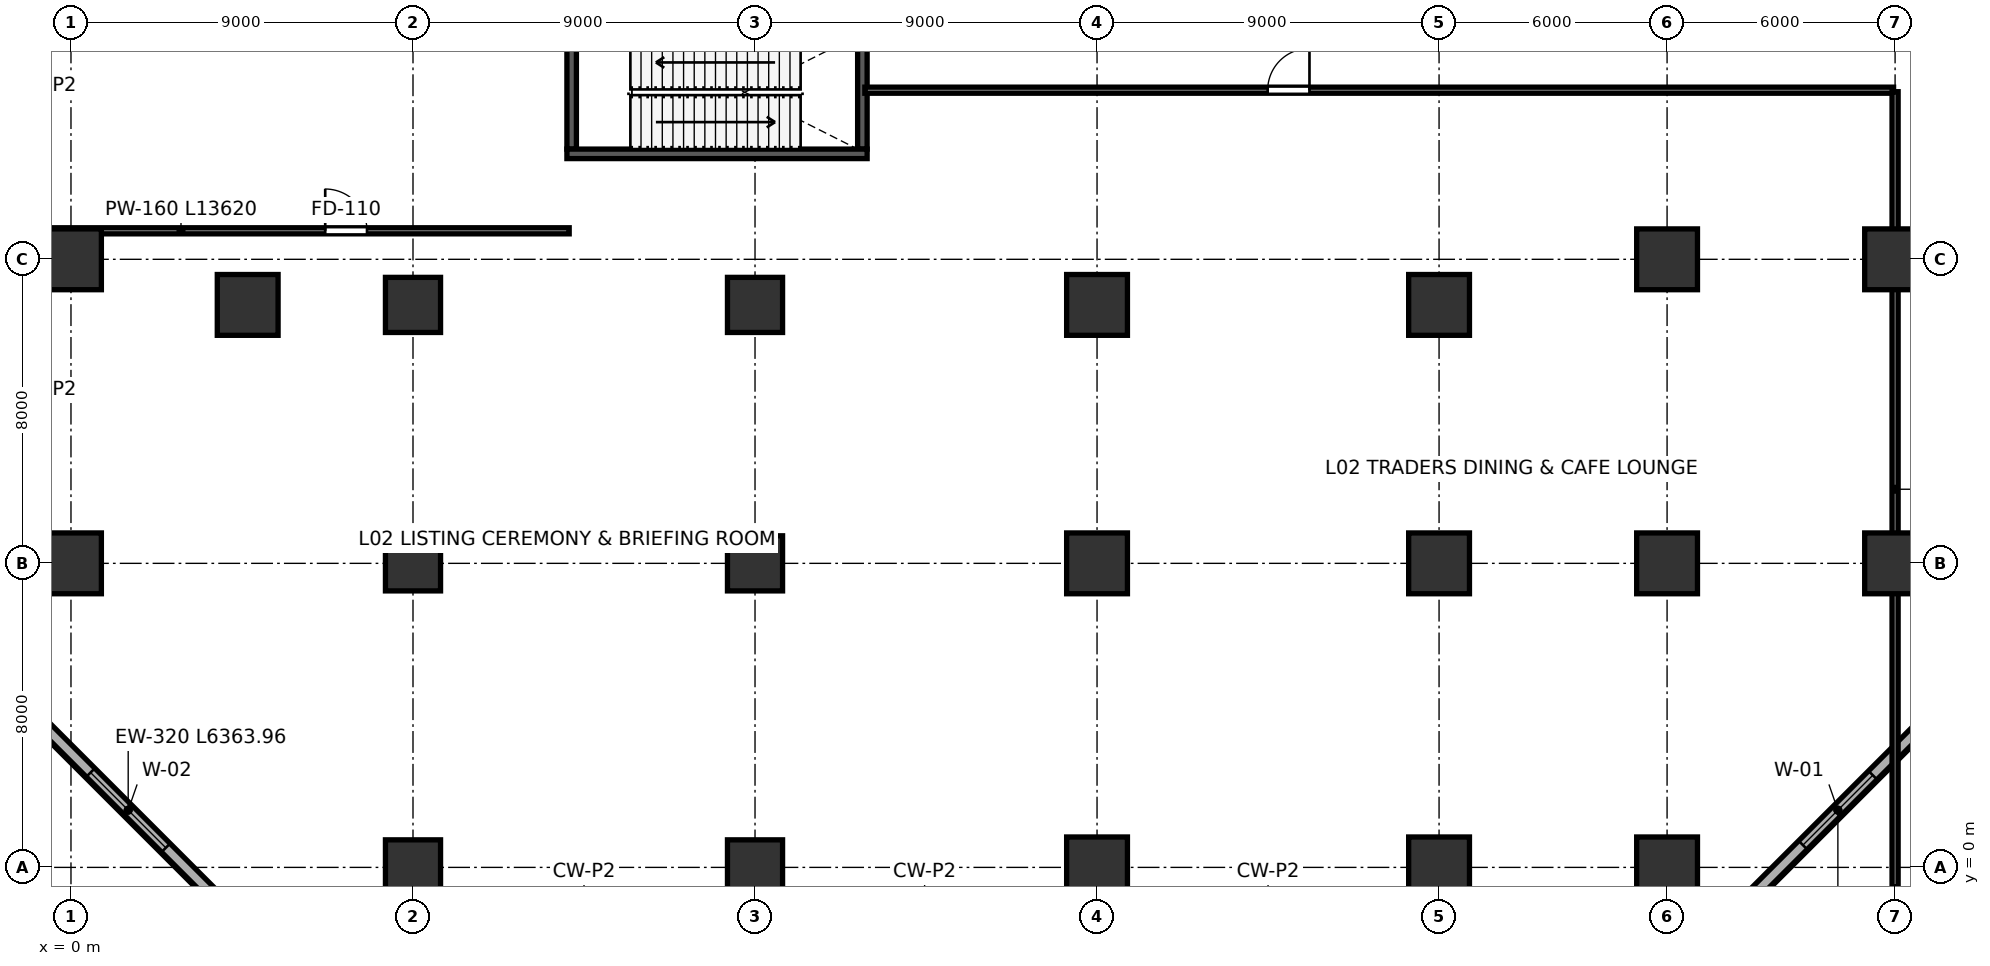
"""IFC4 building model, lengths in metres.
Left out: names, types, materials, properties, quantities, classifications, styles, units other than length and angle.
Written with IfcOpenShell. Run it as: python <this file> out.ifc"""

import sys

from ifc_helpers import new_model, si_unit, direction, frame, frame_2d, origin, origin_2d, place, context, subcontext, project, spatial, rectangle, extrude, source, transform, mapped, element, fill, save


model = new_model("IFC4")
c1 = context("Model", 3, precision=1e-05, world=origin(), true_north=direction((0.0, 1.0)))
c2 = subcontext(c1, "Body", "Model", "MODEL_VIEW")
j1 = project(units=[si_unit("LENGTHUNIT", "METRE"), si_unit("PLANEANGLEUNIT", "RADIAN")], contexts=[c1])
p1 = place(None, origin())
s1 = spatial("IfcSite", under=j1, at=p1, CompositionType="ELEMENT")
p2 = place(p1, origin())
s2 = spatial("IfcBuilding", under=s1, at=p2, CompositionType="ELEMENT")
p3 = place(p2, frame((0.0, 0.0, 6.0)))
s3 = spatial("IfcBuildingStorey", under=s2, at=p3, CompositionType="ELEMENT", Elevation=6.0)
m1 = source(origin(), c2, "Body", "SweptSolid", [
    extrude(rectangle(XDim=1.6, YDim=1.6, at=origin_2d()), origin(), (0.0, 0.0, 1.0), 5.999),
])
for number, where, z_axis, x_axis in (
    (1, (0.0, 8.0, 0.001), (0.0, 0.0, 1.0), (1.0, 0.0, 0.0)),
    (2, (0.0, 16.0, 0.001), (0.0, 0.0, 1.0), (1.0, 0.0, 0.0)),
):
    element("IfcColumn", number, at=place(p3, frame(where, z_axis=z_axis, x_axis=x_axis)), inside=s3, PredefinedType="COLUMN", context=c2, shape_type="MappedRepresentation", body=[
        mapped(m1, transform((0.0, 0.0, 0.0), scale=1.0)),
    ])
m2 = source(origin(), c2, "Body", "SweptSolid", [
    extrude(rectangle(XDim=1.45, YDim=1.45, at=origin_2d()), origin(), (0.0, 0.0, 1.0), 5.999),
])
p4 = place(p3, frame((9.0, 0.0, 0.001), z_axis=(0.0, 0.0, 1.0), x_axis=(1.0, 0.0, 0.0)))
e3 = element("IfcColumn", 3, at=p4, inside=s3, PredefinedType="COLUMN", context=c2, shape_type="MappedRepresentation", body=[
    mapped(m2, transform((0.0, 0.0, 0.0), scale=1.0)),
])
m3 = source(origin(), c2, "Body", "SweptSolid", [
    extrude(rectangle(XDim=1.45, YDim=1.45, at=origin_2d()), origin(), (0.0, 0.0, 1.0), 5.999),
])
for number, where, z_axis, x_axis in (
    (4, (9.0, 8.0, 0.001), (0.0, 0.0, 1.0), (1.0, 0.0, 0.0)),
    (5, (9.0, 14.8, 0.001), (0.0, 0.0, 1.0), (1.0, 0.0, 0.0)),
):
    element("IfcColumn", number, at=place(p3, frame(where, z_axis=z_axis, x_axis=x_axis)), inside=s3, PredefinedType="COLUMN", context=c2, shape_type="MappedRepresentation", body=[
        mapped(m3, transform((0.0, 0.0, 0.0), scale=1.0)),
    ])
p5 = place(p3, frame((18.0, 0.0, 0.001), z_axis=(0.0, 0.0, 1.0), x_axis=(1.0, 0.0, 0.0)))
e6 = element("IfcColumn", 6, at=p5, inside=s3, PredefinedType="COLUMN", context=c2, shape_type="MappedRepresentation", body=[
    mapped(m2, transform((0.0, 0.0, 0.0), scale=1.0)),
])
for number, where, z_axis, x_axis in (
    (7, (18.0, 8.0, 0.001), (0.0, 0.0, 1.0), (1.0, 0.0, 0.0)),
    (8, (18.0, 14.8, 0.001), (0.0, 0.0, 1.0), (1.0, 0.0, 0.0)),
):
    element("IfcColumn", number, at=place(p3, frame(where, z_axis=z_axis, x_axis=x_axis)), inside=s3, PredefinedType="COLUMN", context=c2, shape_type="MappedRepresentation", body=[
        mapped(m3, transform((0.0, 0.0, 0.0), scale=1.0)),
    ])
p6 = place(p3, frame((27.0, 0.0, 0.001), z_axis=(0.0, 0.0, 1.0), x_axis=(1.0, 0.0, 0.0)))
e9 = element("IfcColumn", 9, at=p6, inside=s3, PredefinedType="COLUMN", context=c2, shape_type="MappedRepresentation", body=[
    mapped(m1, transform((0.0, 0.0, 0.0), scale=1.0)),
])
m4 = source(origin(), c2, "Body", "SweptSolid", [
    extrude(rectangle(XDim=1.6, YDim=1.6, at=origin_2d()), origin(), (0.0, 0.0, 1.0), 5.999),
])
for number, where, z_axis, x_axis in (
    (10, (27.0, 8.0, 0.001), (0.0, 0.0, 1.0), (1.0, 0.0, 0.0)),
    (11, (27.0, 14.8, 0.001), (0.0, 0.0, 1.0), (1.0, 0.0, 0.0)),
):
    element("IfcColumn", number, at=place(p3, frame(where, z_axis=z_axis, x_axis=x_axis)), inside=s3, PredefinedType="COLUMN", context=c2, shape_type="MappedRepresentation", body=[
        mapped(m4, transform((0.0, 0.0, 0.0), scale=1.0)),
    ])
p7 = place(p3, frame((36.0, 0.0, 0.001), z_axis=(0.0, 0.0, 1.0), x_axis=(1.0, 0.0, 0.0)))
e12 = element("IfcColumn", 12, at=p7, inside=s3, PredefinedType="COLUMN", context=c2, shape_type="MappedRepresentation", body=[
    mapped(m1, transform((0.0, 0.0, 0.0), scale=1.0)),
])
for number, where, z_axis, x_axis in (
    (13, (36.0, 8.0, 0.001), (0.0, 0.0, 1.0), (1.0, 0.0, 0.0)),
    (14, (36.0, 14.8, 0.001), (0.0, 0.0, 1.0), (1.0, 0.0, 0.0)),
):
    element("IfcColumn", number, at=place(p3, frame(where, z_axis=z_axis, x_axis=x_axis)), inside=s3, PredefinedType="COLUMN", context=c2, shape_type="MappedRepresentation", body=[
        mapped(m4, transform((0.0, 0.0, 0.0), scale=1.0)),
    ])
p8 = place(p3, frame((42.0, 0.0, 0.001), z_axis=(0.0, 0.0, 1.0), x_axis=(1.0, 0.0, 0.0)))
e15 = element("IfcColumn", 15, at=p8, inside=s3, PredefinedType="COLUMN", context=c2, shape_type="MappedRepresentation", body=[
    mapped(m1, transform((0.0, 0.0, 0.0), scale=1.0)),
])
for number, where, z_axis, x_axis in (
    (16, (42.0, 8.0, 0.001), (0.0, 0.0, 1.0), (1.0, 0.0, 0.0)),
    (17, (42.0, 16.0, 0.001), (0.0, 0.0, 1.0), (1.0, 0.0, 0.0)),
):
    element("IfcColumn", number, at=place(p3, frame(where, z_axis=z_axis, x_axis=x_axis)), inside=s3, PredefinedType="COLUMN", context=c2, shape_type="MappedRepresentation", body=[
        mapped(m4, transform((0.0, 0.0, 0.0), scale=1.0)),
    ])
for number, where, z_axis, x_axis in (
    (18, (48.0, 8.0, 0.001), (0.0, 0.0, 1.0), (1.0, 0.0, 0.0)),
    (19, (48.0, 16.0, 0.001), (0.0, 0.0, 1.0), (1.0, 0.0, 0.0)),
):
    element("IfcColumn", number, at=place(p3, frame(where, z_axis=z_axis, x_axis=x_axis)), inside=s3, PredefinedType="COLUMN", context=c2, shape_type="MappedRepresentation", body=[
        mapped(m1, transform((0.0, 0.0, 0.0), scale=1.0)),
    ])
p9 = place(p3, frame((4.65, 14.8, 0.001), z_axis=(0.0, 0.0, 1.0), x_axis=(1.0, 0.0, 0.0)))
e20 = element("IfcColumn", 20, at=p9, inside=s3, PredefinedType="COLUMN", context=c2, shape_type="MappedRepresentation", body=[
    mapped(m4, transform((0.0, 0.0, 0.0), scale=1.0)),
])
p10 = place(p3, frame((44.244, -0.744, 0.0), z_axis=(0.0, 0.0, 1.0), x_axis=(0.707106781187, 0.707106781187, 0.0)))
e21 = element("IfcWall", 21, at=p10, inside=s3, PredefinedType="SOLIDWALL", context=c2, shape_type="SweptSolid", body=[
    extrude(rectangle(XDim=6.364, YDim=0.32, at=frame_2d((3.182, 0.0))), origin(), (0.0, 0.0, 1.0), 5.74),
])
p11 = place(p10, frame((1.882, 0.0, 0.65)))
e22 = element("IfcOpeningElement", 22, at=p11, cuts=e21, PredefinedType="OPENING", context=c2, shape_type="SweptSolid", body=[
    extrude(rectangle(XDim=2.6, YDim=2.35, at=frame_2d((1.3, 1.175))), frame((0.0, 0.17, 0.0), z_axis=(0.0, -1.0, 0.0), x_axis=(1.0, 0.0, 0.0)), (0.0, 0.0, 1.0), 0.34),
])
p12 = place(p3, frame((-0.744, 3.756, 0.0), z_axis=(0.0, 0.0, 1.0), x_axis=(0.707106781187, -0.707106781187, 0.0)))
e23 = element("IfcWall", 23, at=p12, inside=s3, PredefinedType="SOLIDWALL", context=c2, shape_type="SweptSolid", body=[
    extrude(rectangle(XDim=6.364, YDim=0.32, at=frame_2d((3.182, 0.0))), origin(), (0.0, 0.0, 1.0), 5.74),
])
p13 = place(p12, frame((1.782, 0.0, 0.65)))
e24 = element("IfcOpeningElement", 24, at=p13, cuts=e23, PredefinedType="OPENING", context=c2, shape_type="SweptSolid", body=[
    extrude(rectangle(XDim=2.8, YDim=2.35, at=frame_2d((1.4, 1.175))), frame((0.0, 0.17, 0.0), z_axis=(0.0, -1.0, 0.0), x_axis=(1.0, 0.0, 0.0)), (0.0, 0.0, 1.0), 0.34),
])
for number, where, z_axis, x_axis in (
    (25, (13.175, 18.9, 0.0), (0.0, 0.0, 1.0), (0.0, 1.0, 0.0)),
    (26, (20.825, 18.9, 0.0), (0.0, 0.0, 1.0), (0.0, 1.0, 0.0)),
):
    element("IfcWall", number, at=place(p3, frame(where, z_axis=z_axis, x_axis=x_axis)), inside=s3, PredefinedType="SHEAR", context=c2, shape_type="SweptSolid", body=[
        extrude(rectangle(XDim=2.99, YDim=0.25, at=frame_2d((1.495, 0.0))), origin(), (0.0, 0.0, 1.0), 5.74),
    ])
p14 = place(p3, frame((13.05, 18.775, 0.0), z_axis=(0.0, 0.0, 1.0), x_axis=(1.0, 0.0, 0.0)))
e27 = element("IfcWall", 27, at=p14, inside=s3, PredefinedType="SHEAR", context=c2, shape_type="SweptSolid", body=[
    extrude(rectangle(XDim=7.9, YDim=0.25, at=frame_2d((3.95, 0.0))), origin(), (0.0, 0.0, 1.0), 5.74),
])
p15 = place(p3, frame((-0.51, 16.75, 0.0), z_axis=(0.0, 0.0, 1.0), x_axis=(1.0, 0.0, 0.0)))
e28 = element("IfcWall", 28, at=p15, inside=s3, PredefinedType="PARTITIONING", context=c2, shape_type="SweptSolid", body=[
    extrude(rectangle(XDim=13.62, YDim=0.16, at=frame_2d((6.81, 0.0))), origin(), (0.0, 0.0, 1.0), 4.869),
])
p16 = place(p15, frame((7.2, 0.0, 0.0)))
e29 = element("IfcOpeningElement", 29, at=p16, cuts=e28, PredefinedType="OPENING", context=c2, shape_type="SweptSolid", body=[
    extrude(rectangle(XDim=1.1, YDim=2.2, at=frame_2d((0.55, 1.1))), frame((0.0, 0.09, 0.0), z_axis=(0.0, -1.0, 0.0), x_axis=(1.0, 0.0, 0.0)), (0.0, 0.0, 1.0), 0.18),
])
p17 = place(p3, frame((20.89, 20.45, 0.0), z_axis=(0.0, 0.0, 1.0), x_axis=(1.0, 0.0, 0.0)))
e30 = element("IfcWall", 30, at=p17, inside=s3, PredefinedType="PARTITIONING", context=c2, shape_type="SweptSolid", body=[
    extrude(rectangle(XDim=27.07, YDim=0.16, at=frame_2d((13.535, 0.0))), origin(), (0.0, 0.0, 1.0), 4.869),
])
p18 = place(p17, frame((10.6, 0.0, 0.0)))
e31 = element("IfcOpeningElement", 31, at=p18, cuts=e30, PredefinedType="OPENING", context=c2, shape_type="SweptSolid", body=[
    extrude(rectangle(XDim=1.1, YDim=2.2, at=frame_2d((0.55, 1.1))), frame((0.0, 0.09, 0.0), z_axis=(0.0, -1.0, 0.0), x_axis=(1.0, 0.0, 0.0)), (0.0, 0.0, 1.0), 0.18),
])
p19 = place(p3, frame((48.0, -0.51, 0.0), z_axis=(0.0, 0.0, 1.0), x_axis=(0.0, 1.0, 0.0)))
e32 = element("IfcWall", 32, at=p19, inside=s3, PredefinedType="PARTITIONING", context=c2, shape_type="SweptSolid", body=[
    extrude(rectangle(XDim=20.92, YDim=0.16, at=frame_2d((10.46, 0.0))), origin(), (0.0, 0.0, 1.0), 4.875),
])
m5 = source(origin(), c2, "Body", "SweptSolid", [
    extrude(rectangle(XDim=2.6, YDim=2.35, at=frame_2d((1.3, 1.175))), frame((0.0, 0.03, 0.0), z_axis=(0.0, -1.0, 0.0), x_axis=(1.0, 0.0, 0.0)), (0.0, 0.0, 1.0), 0.06),
])
p20 = place(p11, origin())
e33 = element("IfcWindow", 33, at=p20, inside=s3, PartitioningType="DOUBLE_PANEL_VERTICAL", PredefinedType="WINDOW", context=c2, shape_type="MappedRepresentation", body=[
    mapped(m5, transform((0.0, 0.0, 0.0), scale=1.0)),
])
fill(e22, e33)
m6 = source(origin(), c2, "Body", "SweptSolid", [
    extrude(rectangle(XDim=2.8, YDim=2.35, at=frame_2d((1.4, 1.175))), frame((0.0, 0.03, 0.0), z_axis=(0.0, -1.0, 0.0), x_axis=(1.0, 0.0, 0.0)), (0.0, 0.0, 1.0), 0.06),
])
p21 = place(p13, origin())
e34 = element("IfcWindow", 34, at=p21, inside=s3, PartitioningType="DOUBLE_PANEL_VERTICAL", PredefinedType="WINDOW", context=c2, shape_type="MappedRepresentation", body=[
    mapped(m6, transform((0.0, 0.0, 0.0), scale=1.0)),
])
fill(e24, e34)
m7 = source(origin(), c2, "Body", "SweptSolid", [
    extrude(rectangle(XDim=1.1, YDim=2.2, at=frame_2d((0.55, 1.1))), frame((0.0, 0.025, 0.0), z_axis=(0.0, -1.0, 0.0), x_axis=(1.0, 0.0, 0.0)), (0.0, 0.0, 1.0), 0.05),
])
p22 = place(p16, origin())
e35 = element("IfcDoor", 35, at=p22, inside=s3, OperationType="SINGLE_SWING_LEFT", PredefinedType="DOOR", context=c2, shape_type="MappedRepresentation", body=[
    mapped(m7, transform((0.0, 0.0, 0.0), scale=1.0)),
])
fill(e29, e35)
p23 = place(p18, origin())
e36 = element("IfcDoor", 36, at=p23, inside=s3, OperationType="SINGLE_SWING_RIGHT", PredefinedType="DOOR", context=c2, shape_type="MappedRepresentation", body=[
    mapped(m7, transform((0.0, 0.0, 0.0), scale=1.0)),
])
fill(e31, e36)
save(model, sys.argv[1])
